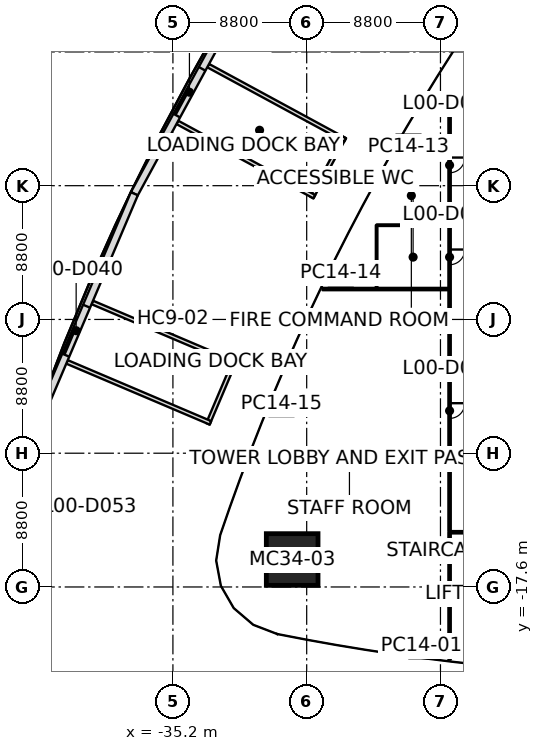
"""IFC4 building model, lengths in metres.
Left out: names, types, materials, properties, quantities, classifications, styles, units other than length and angle.
Written with IfcOpenShell. Run it as: python <this file> out.ifc"""

import sys

from ifc_helpers import new_model, si_unit, direction, frame, frame_2d, origin, origin_2d, place, context, subcontext, project, spatial, rectangle, extrude, element, fill, save


model = new_model("IFC4")
c1 = context("Model", 3, precision=1e-05, world=origin(), true_north=direction((0.0, 1.0)))
c2 = subcontext(c1, "Body", "Model", "MODEL_VIEW")
j1 = project(units=[si_unit("LENGTHUNIT", "METRE"), si_unit("PLANEANGLEUNIT", "RADIAN")], contexts=[c1])
p1 = place(None, origin())
s1 = spatial("IfcSite", under=j1, at=p1, CompositionType="ELEMENT")
p2 = place(p1, origin())
s2 = spatial("IfcBuilding", under=s1, at=p2, CompositionType="ELEMENT")
p3 = place(p2, origin())
s3 = spatial("IfcBuildingStorey", under=s2, at=p3, CompositionType="ELEMENT", Elevation=0.0)
p4 = place(p3, frame((-27.355, -15.793, 0.0), z_axis=(0.0, 0.0, 1.0), x_axis=(1.0, 0.0, 0.0)))
e1 = element("IfcColumn", 1, at=p4, inside=s3, PredefinedType="COLUMN", context=c2, shape_type="SweptSolid", body=[
    extrude(rectangle(XDim=3.4, YDim=3.4, at=origin_2d()), origin(), (0.0, 0.0, 1.0), 9.0),
])
for number, where, z_axis, x_axis in (
    (2, (-18.86, -21.508, 0.0), (0.0, 0.0, 1.0), (-0.991, 0.131, 0.0)),
    (3, (-19.702, 11.375, 0.0), (0.0, 0.0, 1.0), (0.5, 0.866, 0.0)),
    (4, (-24.158, 3.035, 0.0), (0.0, 0.0, 1.0), (0.442, 0.897, 0.0)),
    (5, (-28.057, -5.579, 0.0), (0.0, 0.0, 1.0), (0.382, 0.924, 0.0)),
):
    element("IfcColumn", number, at=place(p3, frame(where, z_axis=z_axis, x_axis=x_axis)), inside=s3, PredefinedType="COLUMN", context=c2, shape_type="SweptSolid", body=[
        extrude(rectangle(XDim=1.4, YDim=1.4, at=origin_2d()), origin(), (0.0, 0.0, 1.0), 9.0),
    ])
p5 = place(p3, frame((-35.2, 0.0, 0.0), z_axis=(0.0, 0.0, 1.0), x_axis=(1.0, 0.0, 0.0)))
e6 = element("IfcColumn", 6, at=p5, inside=s3, PredefinedType="COLUMN", context=c2, shape_type="SweptSolid", body=[
    extrude(rectangle(XDim=0.9, YDim=0.9, at=origin_2d()), origin(), (0.0, 0.0, 1.0), 8.34),
])
p6 = place(p3, frame((-37.737, 8.269, 0.0), z_axis=(0.0, 0.0, 1.0), x_axis=(0.476773695068, 0.879026076798, 0.0)))
e7 = element("IfcWall", 7, at=p6, inside=s3, PredefinedType="STANDARD", context=c2, shape_type="SweptSolid", body=[
    extrude(rectangle(XDim=15.005, YDim=0.5, at=frame_2d((7.502, 0.0))), origin(), (0.0, 0.0, 1.0), 8.75),
])
p7 = place(p6, frame((5.85, 0.0, 0.0)))
e8 = element("IfcOpeningElement", 8, at=p7, cuts=e7, PredefinedType="OPENING", context=c2, shape_type="SweptSolid", body=[
    extrude(rectangle(XDim=3.5, YDim=4.5, at=frame_2d((1.75, 2.25))), frame((0.0, 0.25, 0.0), z_axis=(0.0, -1.0, 0.0), x_axis=(1.0, 0.0, 0.0)), (0.0, 0.0, 1.0), 0.5),
])
p8 = place(p3, frame((-34.907, 12.963, 0.0), z_axis=(0.0, 0.0, 1.0), x_axis=(0.879024580486, -0.476776453803, 0.0)))
e9 = element("IfcWall", 9, at=p8, inside=s3, PredefinedType="STANDARD", context=c2, shape_type="SweptSolid", body=[
    extrude(rectangle(XDim=10.25, YDim=0.25, at=frame_2d((5.125, 0.0))), origin(), (0.0, 0.0, 1.0), 8.75),
])
p9 = place(p3, frame((-32.881, 16.698, 0.0), z_axis=(0.0, 0.0, 1.0), x_axis=(0.879029994655, -0.476766471658, 0.0)))
e10 = element("IfcWall", 10, at=p9, inside=s3, PredefinedType="STANDARD", context=c2, shape_type="SweptSolid", body=[
    extrude(rectangle(XDim=10.25, YDim=0.25, at=frame_2d((5.125, 0.0))), origin(), (0.0, 0.0, 1.0), 8.75),
])
p10 = place(p3, frame((-26.067, 8.025, 0.0), z_axis=(0.0, 0.0, 1.0), x_axis=(0.476782935346, 0.879021064914, 0.0)))
e11 = element("IfcWall", 11, at=p10, inside=s3, PredefinedType="STANDARD", context=c2, shape_type="SweptSolid", body=[
    extrude(rectangle(XDim=4.5, YDim=0.25, at=frame_2d((2.25, 0.0))), origin(), (0.0, 0.0, 1.0), 8.75),
])
p11 = place(p3, frame((-43.657, -5.664, 0.0), z_axis=(0.0, 0.0, 1.0), x_axis=(0.391062095871, 0.920364295903, 0.0)))
e12 = element("IfcWall", 12, at=p11, inside=s3, PredefinedType="STANDARD", context=c2, shape_type="SweptSolid", body=[
    extrude(rectangle(XDim=15.139, YDim=0.5, at=frame_2d((7.569, 0.0))), origin(), (0.0, 0.0, 1.0), 8.75),
])
p12 = place(p11, frame((3.6, 0.0, 0.0)))
e13 = element("IfcOpeningElement", 13, at=p12, cuts=e12, PredefinedType="OPENING", context=c2, shape_type="SweptSolid", body=[
    extrude(rectangle(XDim=3.5, YDim=4.5, at=frame_2d((1.75, 2.25))), frame((0.0, 0.25, 0.0), z_axis=(0.0, -1.0, 0.0), x_axis=(1.0, 0.0, 0.0)), (0.0, 0.0, 1.0), 0.5),
])
p13 = place(p3, frame((-42.166, -2.794, 0.0), z_axis=(0.0, 0.0, 1.0), x_axis=(0.920368854693, -0.391051366589, 0.0)))
e14 = element("IfcWall", 14, at=p13, inside=s3, PredefinedType="STANDARD", context=c2, shape_type="SweptSolid", body=[
    extrude(rectangle(XDim=10.25, YDim=0.25, at=frame_2d((5.125, 0.0))), origin(), (0.0, 0.0, 1.0), 8.75),
])
p14 = place(p3, frame((-40.504, 1.118, 0.0), z_axis=(0.0, 0.0, 1.0), x_axis=(0.920365212228, -0.391059939295, 0.0)))
e15 = element("IfcWall", 15, at=p14, inside=s3, PredefinedType="STANDARD", context=c2, shape_type="SweptSolid", body=[
    extrude(rectangle(XDim=10.25, YDim=0.25, at=frame_2d((5.125, 0.0))), origin(), (0.0, 0.0, 1.0), 8.75),
])
p15 = place(p3, frame((-32.896, -6.868, 0.0), z_axis=(0.0, 0.0, 1.0), x_axis=(0.391062517834, 0.920364116611, 0.0)))
e16 = element("IfcWall", 16, at=p15, inside=s3, PredefinedType="STANDARD", context=c2, shape_type="SweptSolid", body=[
    extrude(rectangle(XDim=4.5, YDim=0.25, at=frame_2d((2.25, 0.0))), origin(), (0.0, 0.0, 1.0), 8.75),
])
p16 = place(p3, frame((-17.0, 2.0, 0.0), z_axis=(0.0, 0.0, 1.0), x_axis=(-1.0, 0.0, 0.0)))
e17 = element("IfcWall", 17, at=p16, inside=s3, PredefinedType="PARTITIONING", context=c2, shape_type="SweptSolid", body=[
    extrude(rectangle(XDim=8.361, YDim=0.15, at=frame_2d((4.181, 0.0))), origin(), (0.0, 0.0, 1.0), 7.94),
])
p17 = place(p3, frame((-17.0, 14.0, 0.0), z_axis=(0.0, 0.0, 1.0), x_axis=(-1.0, 0.0, 0.0)))
e18 = element("IfcWall", 18, at=p17, inside=s3, PredefinedType="PARTITIONING", context=c2, shape_type="SweptSolid", body=[
    extrude(rectangle(XDim=1.883, YDim=0.15, at=frame_2d((0.942, 0.0))), origin(), (0.0, 0.0, 1.0), 7.94),
])
p18 = place(p3, frame((-17.0, -14.0, 0.0), z_axis=(0.0, 0.0, 1.0), x_axis=(0.0, -1.0, 0.0)))
e19 = element("IfcWall", 19, at=p18, inside=s3, PredefinedType="PARTITIONING", context=c2, shape_type="SweptSolid", body=[
    extrude(rectangle(XDim=8.375, YDim=0.15, at=frame_2d((4.187, 0.0))), origin(), (0.0, 0.0, 1.0), 7.94),
])
p19 = place(p3, frame((-17.0, 13.92, 0.0), z_axis=(0.0, 0.0, 1.0), x_axis=(0.0, -1.0, 0.0)))
e20 = element("IfcWall", 20, at=p19, inside=s3, PredefinedType="PARTITIONING", context=c2, shape_type="SweptSolid", body=[
    extrude(rectangle(XDim=27.84, YDim=0.15, at=frame_2d((13.92, 0.0))), origin(), (0.0, 0.0, 1.0), 7.847),
])
p20 = place(p19, frame((9.32, 0.0, 0.0)))
e21 = element("IfcOpeningElement", 21, at=p20, cuts=e20, PredefinedType="OPENING", context=c2, shape_type="SweptSolid", body=[
    extrude(rectangle(XDim=1.0, YDim=2.1, at=frame_2d((0.5, 1.05))), frame((0.0, 0.075, 0.0), z_axis=(0.0, -1.0, 0.0), x_axis=(1.0, 0.0, 0.0)), (0.0, 0.0, 1.0), 0.15),
])
p21 = place(p19, frame((3.27, 0.0, 0.0)))
e22 = element("IfcOpeningElement", 22, at=p21, cuts=e20, PredefinedType="OPENING", context=c2, shape_type="SweptSolid", body=[
    extrude(rectangle(XDim=1.0, YDim=2.1, at=frame_2d((0.5, 1.05))), frame((0.0, 0.075, 0.0), z_axis=(0.0, -1.0, 0.0), x_axis=(1.0, 0.0, 0.0)), (0.0, 0.0, 1.0), 0.15),
])
p22 = place(p19, frame((19.43, 0.0, 0.0)))
e23 = element("IfcOpeningElement", 23, at=p22, cuts=e20, PredefinedType="OPENING", context=c2, shape_type="SweptSolid", body=[
    extrude(rectangle(XDim=1.0, YDim=2.1, at=frame_2d((0.5, 1.05))), frame((0.0, 0.075, 0.0), z_axis=(0.0, -1.0, 0.0), x_axis=(1.0, 0.0, 0.0)), (0.0, 0.0, 1.0), 0.15),
])
p23 = place(p3, frame((-16.92, -14.0, 0.0), z_axis=(0.0, 0.0, 1.0), x_axis=(1.0, 0.0, 0.0)))
e24 = element("IfcWall", 24, at=p23, inside=s3, PredefinedType="PARTITIONING", context=c2, shape_type="SweptSolid", body=[
    extrude(rectangle(XDim=19.82, YDim=0.15, at=frame_2d((9.91, 0.0))), origin(), (0.0, 0.0, 1.0), 7.94),
])
p24 = place(p23, frame((9.37, 0.0, 0.0)))
e25 = element("IfcOpeningElement", 25, at=p24, cuts=e24, PredefinedType="OPENING", context=c2, shape_type="SweptSolid", body=[
    extrude(rectangle(XDim=1.0, YDim=2.1, at=frame_2d((0.5, 1.05))), frame((0.0, 0.075, 0.0), z_axis=(0.0, -1.0, 0.0), x_axis=(1.0, 0.0, 0.0)), (0.0, 0.0, 1.0), 0.15),
])
p25 = place(p3, frame((2.999, 14.0, 0.0), z_axis=(0.0, 0.0, 1.0), x_axis=(-1.0, 0.0, 0.0)))
e26 = element("IfcWall", 26, at=p25, inside=s3, PredefinedType="PARTITIONING", context=c2, shape_type="SweptSolid", body=[
    extrude(rectangle(XDim=19.919, YDim=0.15, at=frame_2d((9.959, 0.0))), origin(), (0.0, 0.0, 1.0), 7.847),
])
p26 = place(p25, frame((4.0, 0.0, 0.0)))
e27 = element("IfcOpeningElement", 27, at=p26, cuts=e26, PredefinedType="OPENING", context=c2, shape_type="SweptSolid", body=[
    extrude(rectangle(XDim=1.0, YDim=2.1, at=frame_2d((0.5, 1.05))), frame((0.0, 0.075, 0.0), z_axis=(0.0, -1.0, 0.0), x_axis=(1.0, 0.0, 0.0)), (0.0, 0.0, 1.0), 0.15),
])
p27 = place(p25, frame((14.009, 0.0, 0.0)))
e28 = element("IfcOpeningElement", 28, at=p27, cuts=e26, PredefinedType="OPENING", context=c2, shape_type="SweptSolid", body=[
    extrude(rectangle(XDim=1.0, YDim=2.1, at=frame_2d((0.5, 1.05))), frame((0.0, 0.075, 0.0), z_axis=(0.0, -1.0, 0.0), x_axis=(1.0, 0.0, 0.0)), (0.0, 0.0, 1.0), 0.15),
])
p28 = place(p3, frame((-21.8, 2.03, 0.0), z_axis=(0.0, 0.0, 1.0), x_axis=(0.0, 1.0, 0.0)))
e29 = element("IfcWall", 29, at=p28, inside=s3, PredefinedType="PARTITIONING", context=c2, shape_type="SweptSolid", body=[
    extrude(rectangle(XDim=4.17, YDim=0.1, at=frame_2d((2.085, 0.0))), origin(), (0.0, 0.0, 1.0), 7.94),
])
p29 = place(p3, frame((-21.8, 6.2, 0.0), z_axis=(0.0, 0.0, 1.0), x_axis=(1.0, 0.0, 0.0)))
e30 = element("IfcWall", 30, at=p29, inside=s3, PredefinedType="PARTITIONING", context=c2, shape_type="SweptSolid", body=[
    extrude(rectangle(XDim=4.77, YDim=0.1, at=frame_2d((2.385, 0.0))), origin(), (0.0, 0.0, 1.0), 7.94),
])
p30 = place(p7, origin())
e31 = element("IfcDoor", 31, at=p30, inside=s3, OperationType="ROLLINGUP", PredefinedType="DOOR", context=c2, shape_type="SweptSolid", body=[
    extrude(rectangle(XDim=3.5, YDim=4.5, at=frame_2d((1.75, 2.25))), frame((0.0, 0.025, 0.0), z_axis=(0.0, -1.0, 0.0), x_axis=(1.0, 0.0, 0.0)), (0.0, 0.0, 1.0), 0.05),
])
fill(e8, e31)
p31 = place(p12, origin())
e32 = element("IfcDoor", 32, at=p31, inside=s3, OperationType="ROLLINGUP", PredefinedType="DOOR", context=c2, shape_type="SweptSolid", body=[
    extrude(rectangle(XDim=3.5, YDim=4.5, at=frame_2d((1.75, 2.25))), frame((0.0, 0.025, 0.0), z_axis=(0.0, -1.0, 0.0), x_axis=(1.0, 0.0, 0.0)), (0.0, 0.0, 1.0), 0.05),
])
fill(e13, e32)
p32 = place(p20, origin())
e33 = element("IfcDoor", 33, at=p32, inside=s3, OperationType="SINGLE_SWING_LEFT", PredefinedType="DOOR", context=c2, shape_type="SweptSolid", body=[
    extrude(rectangle(XDim=1.0, YDim=2.1, at=frame_2d((0.5, 1.05))), frame((0.0, 0.025, 0.0), z_axis=(0.0, -1.0, 0.0), x_axis=(1.0, 0.0, 0.0)), (0.0, 0.0, 1.0), 0.05),
])
fill(e21, e33)
p33 = place(p21, origin())
e34 = element("IfcDoor", 34, at=p33, inside=s3, OperationType="SINGLE_SWING_RIGHT", PredefinedType="DOOR", context=c2, shape_type="SweptSolid", body=[
    extrude(rectangle(XDim=1.0, YDim=2.1, at=frame_2d((0.5, 1.05))), frame((0.0, 0.025, 0.0), z_axis=(0.0, -1.0, 0.0), x_axis=(1.0, 0.0, 0.0)), (0.0, 0.0, 1.0), 0.05),
])
fill(e22, e34)
p34 = place(p22, origin())
e35 = element("IfcDoor", 35, at=p34, inside=s3, OperationType="SINGLE_SWING_LEFT", PredefinedType="DOOR", context=c2, shape_type="SweptSolid", body=[
    extrude(rectangle(XDim=1.0, YDim=2.1, at=frame_2d((0.5, 1.05))), frame((0.0, 0.025, 0.0), z_axis=(0.0, -1.0, 0.0), x_axis=(1.0, 0.0, 0.0)), (0.0, 0.0, 1.0), 0.05),
])
fill(e23, e35)
save(model, sys.argv[1])
